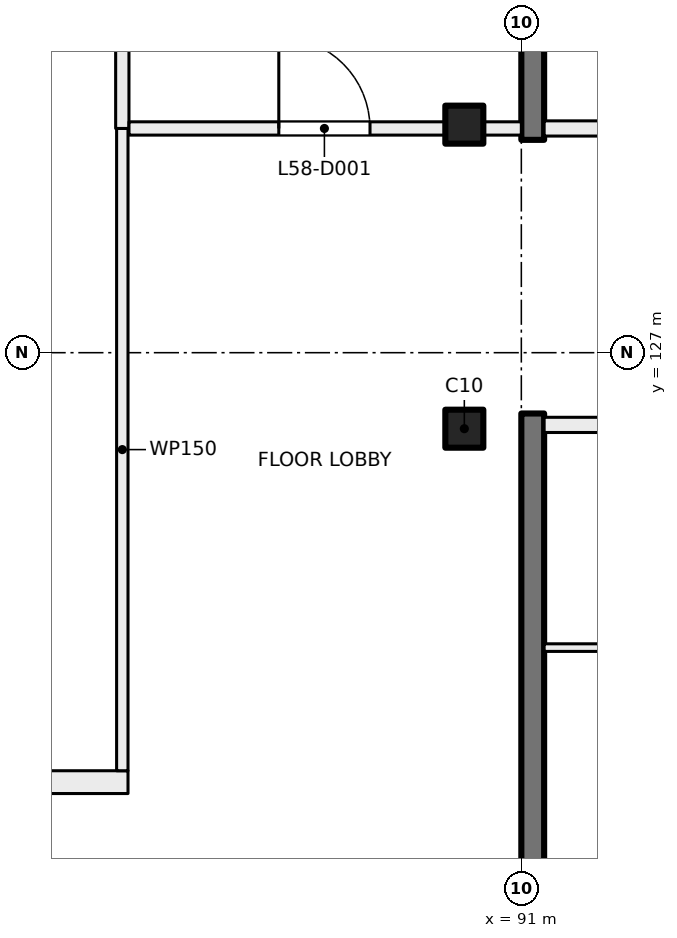
"""IFC4 building model, lengths in metres.
Left out: names, types, materials, properties, quantities, classifications, styles, units other than length and angle.
Written with IfcOpenShell. Run it as: python <this file> out.ifc"""

import sys

from ifc_helpers import new_model, si_unit, direction, frame, frame_2d, origin, origin_2d, place, context, subcontext, project, spatial, rectangle, extrude, element, fill, save


model = new_model("IFC4")
c1 = context("Model", 3, precision=1e-05, world=origin(), true_north=direction((0.0, 1.0)))
c2 = subcontext(c1, "Body", "Model", "MODEL_VIEW")
j1 = project(units=[si_unit("LENGTHUNIT", "METRE"), si_unit("PLANEANGLEUNIT", "RADIAN")], contexts=[c1])
p1 = place(None, origin())
s1 = spatial("IfcSite", under=j1, at=p1, CompositionType="ELEMENT")
p2 = place(p1, origin())
s2 = spatial("IfcBuilding", under=s1, at=p2, CompositionType="ELEMENT")
p3 = place(p2, frame((0.0, 0.0, 245.5)))
s3 = spatial("IfcBuildingStorey", under=s2, at=p3, CompositionType="ELEMENT", Elevation=245.5)
for number, where, z_axis, x_axis in (
    (1, (90.25, 130.0, 0.0), (0.0, 0.0, 1.0), (1.0, 0.0, 0.0)),
    (2, (90.25, 126.0, 0.0), (0.0, 0.0, 1.0), (1.0, 0.0, 0.0)),
):
    element("IfcColumn", number, at=place(p3, frame(where, z_axis=z_axis, x_axis=x_axis)), inside=s3, PredefinedType="COLUMN", context=c2, shape_type="SweptSolid", body=[
        extrude(rectangle(XDim=0.5, YDim=0.5, at=origin_2d()), origin(), (0.0, 0.0, 1.0), 4.0),
    ])
for number, where, z_axis, x_axis in (
    (3, (91.15, 138.55, 0.0), (0.0, 0.0, 1.0), (0.0, -1.0, 0.0)),
    (4, (91.15, 126.2, 0.0), (0.0, 0.0, 1.0), (0.0, -1.0, 0.0)),
):
    element("IfcWall", number, at=place(p3, frame(where, z_axis=z_axis, x_axis=x_axis)), inside=s3, PredefinedType="SHEAR", context=c2, shape_type="SweptSolid", body=[
        extrude(rectangle(XDim=8.75, YDim=0.3, at=frame_2d((4.375, 0.0))), origin(), (0.0, 0.0, 1.0), 4.0),
    ])
p4 = place(p3, frame((95.25, 126.05, 0.0), z_axis=(0.0, 0.0, 1.0), x_axis=(-1.0, 0.0, 0.0)))
e5 = element("IfcWall", 5, at=p4, inside=s3, PredefinedType="PARTITIONING", context=c2, shape_type="SweptSolid", body=[
    extrude(rectangle(XDim=3.95, YDim=0.2, at=frame_2d((1.975, 0.0))), origin(), (0.0, 0.0, 1.0), 3.625),
])
p5 = place(p4, frame((0.3, 0.0, 0.0)))
e6 = element("IfcOpeningElement", 6, at=p5, cuts=e5, PredefinedType="OPENING", context=c2, shape_type="SweptSolid", body=[
    extrude(rectangle(XDim=1.2, YDim=2.1, at=frame_2d((0.6, 1.05))), frame((0.0, 0.11, 0.0), z_axis=(0.0, -1.0, 0.0), x_axis=(1.0, 0.0, 0.0)), (0.0, 0.0, 1.0), 0.22),
])
p6 = place(p3, frame((93.4, 123.12, 0.0), z_axis=(0.0, 0.0, 1.0), x_axis=(-1.0, 0.0, 0.0)))
e7 = element("IfcWall", 7, at=p6, inside=s3, PredefinedType="PARTITIONING", context=c2, shape_type="SweptSolid", body=[
    extrude(rectangle(XDim=2.1, YDim=0.1, at=frame_2d((1.05, 0.0))), origin(), (0.0, 0.0, 1.0), 3.625),
])
p7 = place(p3, frame((91.3, 129.95, 0.0), z_axis=(0.0, 0.0, 1.0), x_axis=(1.0, 0.0, 0.0)))
e8 = element("IfcWall", 8, at=p7, inside=s3, PredefinedType="PARTITIONING", context=c2, shape_type="SweptSolid", body=[
    extrude(rectangle(XDim=3.95, YDim=0.2, at=frame_2d((1.975, 0.0))), origin(), (0.0, 0.0, 1.0), 3.625),
])
p8 = place(p7, frame((2.45, 0.0, 0.0)))
e9 = element("IfcOpeningElement", 9, at=p8, cuts=e8, PredefinedType="OPENING", context=c2, shape_type="SweptSolid", body=[
    extrude(rectangle(XDim=1.2, YDim=2.1, at=frame_2d((0.6, 1.05))), frame((0.0, 0.11, 0.0), z_axis=(0.0, -1.0, 0.0), x_axis=(1.0, 0.0, 0.0)), (0.0, 0.0, 1.0), 0.22),
])
p9 = place(p3, frame((54.4, 121.35, 0.0), z_axis=(0.0, 0.0, 1.0), x_axis=(1.0, 0.0, 0.0)))
e10 = element("IfcWall", 10, at=p9, inside=s3, PredefinedType="PARTITIONING", context=c2, shape_type="SweptSolid", body=[
    extrude(rectangle(XDim=31.425, YDim=0.3, at=frame_2d((15.712, 0.0))), origin(), (0.0, 0.0, 1.0), 3.625),
])
p10 = place(p9, frame((17.35, 0.0, 0.0)))
e11 = element("IfcOpeningElement", 11, at=p10, cuts=e10, PredefinedType="OPENING", context=c2, shape_type="SweptSolid", body=[
    extrude(rectangle(XDim=1.0, YDim=2.1, at=frame_2d((0.5, 1.05))), frame((0.0, 0.16, 0.0), z_axis=(0.0, -1.0, 0.0), x_axis=(1.0, 0.0, 0.0)), (0.0, 0.0, 1.0), 0.32),
])
p11 = place(p9, frame((25.95, 0.0, 0.0)))
e12 = element("IfcOpeningElement", 12, at=p11, cuts=e10, PredefinedType="OPENING", context=c2, shape_type="SweptSolid", body=[
    extrude(rectangle(XDim=1.8, YDim=2.1, at=frame_2d((0.9, 1.05))), frame((0.0, 0.16, 0.0), z_axis=(0.0, -1.0, 0.0), x_axis=(1.0, 0.0, 0.0)), (0.0, 0.0, 1.0), 0.32),
])
p12 = place(p9, frame((8.25, 0.0, 0.0)))
e13 = element("IfcOpeningElement", 13, at=p12, cuts=e10, PredefinedType="OPENING", context=c2, shape_type="SweptSolid", body=[
    extrude(rectangle(XDim=1.2, YDim=2.1, at=frame_2d((0.6, 1.05))), frame((0.0, 0.16, 0.0), z_axis=(0.0, -1.0, 0.0), x_axis=(1.0, 0.0, 0.0)), (0.0, 0.0, 1.0), 0.32),
])
p13 = place(p3, frame((85.75, 121.5, 0.0), z_axis=(0.0, 0.0, 1.0), x_axis=(0.0, 1.0, 0.0)))
e14 = element("IfcWall", 14, at=p13, inside=s3, PredefinedType="PARTITIONING", context=c2, shape_type="SweptSolid", body=[
    extrude(rectangle(XDim=8.45, YDim=0.15, at=frame_2d((4.225, 0.0))), origin(), (0.0, 0.0, 1.0), 3.625),
])
p14 = place(p3, frame((85.75, 129.95, 0.0), z_axis=(0.0, 0.0, 1.0), x_axis=(0.0, 1.0, 0.0)))
e15 = element("IfcWall", 15, at=p14, inside=s3, PredefinedType="PARTITIONING", context=c2, shape_type="SweptSolid", body=[
    extrude(rectangle(XDim=8.45, YDim=0.175, at=frame_2d((4.225, 0.0))), origin(), (0.0, 0.0, 1.0), 3.625),
])
p15 = place(p3, frame((85.838, 129.95, 0.0), z_axis=(0.0, 0.0, 1.0), x_axis=(1.0, 0.0, 0.0)))
e16 = element("IfcWall", 16, at=p15, inside=s3, PredefinedType="PARTITIONING", context=c2, shape_type="SweptSolid", body=[
    extrude(rectangle(XDim=5.162, YDim=0.175, at=frame_2d((2.581, 0.0))), origin(), (0.0, 0.0, 1.0), 3.625),
])
p16 = place(p15, frame((1.971, 0.0, 0.0)))
e17 = element("IfcOpeningElement", 17, at=p16, cuts=e16, PredefinedType="OPENING", context=c2, shape_type="SweptSolid", body=[
    extrude(rectangle(XDim=1.2, YDim=2.1, at=frame_2d((0.6, 1.05))), frame((0.0, 0.097, 0.0), z_axis=(0.0, -1.0, 0.0), x_axis=(1.0, 0.0, 0.0)), (0.0, 0.0, 1.0), 0.195),
])
p17 = place(p16, origin())
e18 = element("IfcDoor", 18, at=p17, inside=s3, OperationType="DOUBLE_DOOR_SINGLE_SWING", PredefinedType="DOOR", context=c2, shape_type="SweptSolid", body=[
    extrude(rectangle(XDim=1.2, YDim=2.1, at=frame_2d((0.6, 1.05))), frame((0.0, 0.025, 0.0), z_axis=(0.0, -1.0, 0.0), x_axis=(1.0, 0.0, 0.0)), (0.0, 0.0, 1.0), 0.05),
])
fill(e17, e18)
save(model, sys.argv[1])
